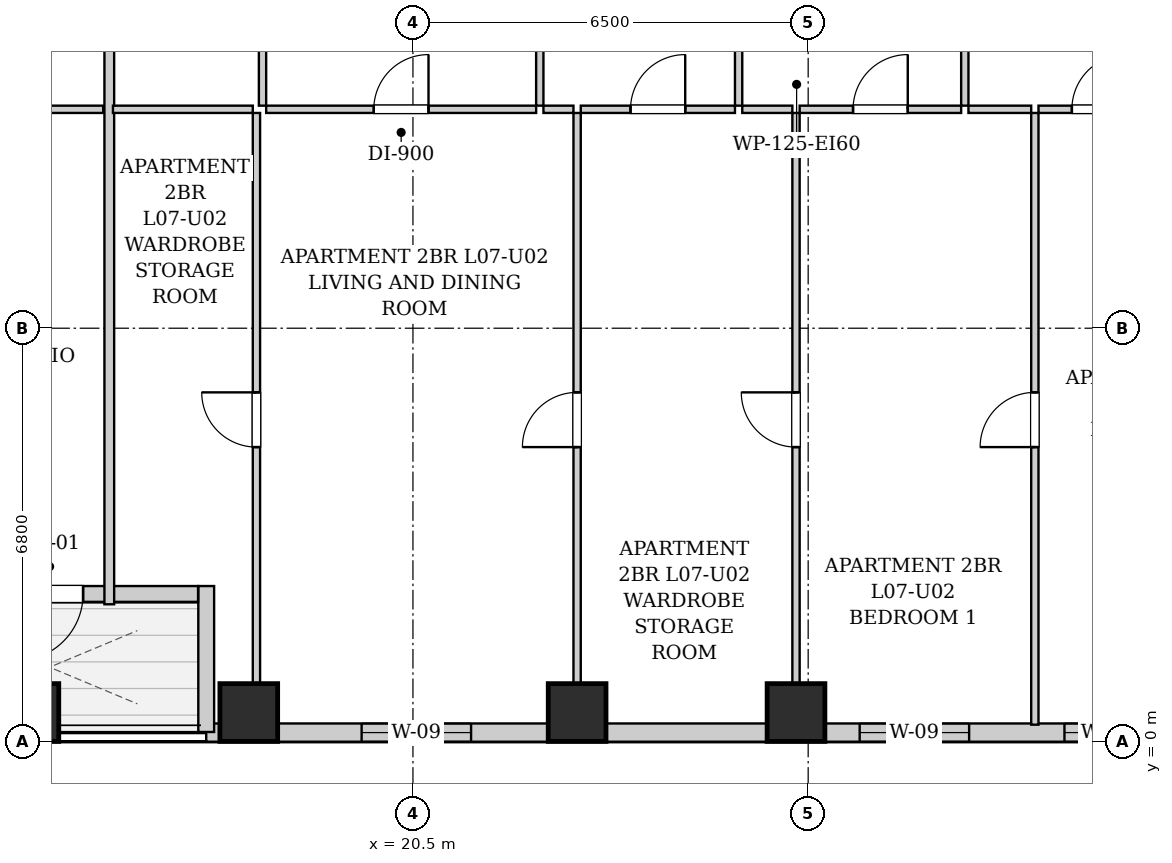
"""IFC4 building model, lengths in metres.
Left out: names, types, materials, properties, quantities, classifications, styles, units other than length and angle.
Written with IfcOpenShell. Run it as: python <this file> out.ifc"""

import sys

from ifc_helpers import new_model, si_unit, direction, frame, frame_2d, origin, origin_2d, place, context, subcontext, project, spatial, rectangle, extrude, element, fill, save


model = new_model("IFC4")
c1 = context("Model", 3, precision=1e-05, world=origin(), true_north=direction((0.0, 1.0)))
c2 = subcontext(c1, "Body", "Model", "MODEL_VIEW")
j1 = project(units=[si_unit("LENGTHUNIT", "METRE"), si_unit("PLANEANGLEUNIT", "RADIAN")], contexts=[c1])
p1 = place(None, origin())
s1 = spatial("IfcSite", under=j1, at=p1, CompositionType="ELEMENT")
p2 = place(p1, origin())
s2 = spatial("IfcBuilding", under=s1, at=p2, CompositionType="ELEMENT")
p3 = place(p2, frame((0.0, 0.0, 32.2)))
s3 = spatial("IfcBuildingStorey", under=s2, at=p3, CompositionType="ELEMENT", Elevation=32.2)
for number, where, z_axis, x_axis in (
    (1, (14.2, 0.48, 0.0), (0.0, 0.0, 1.0), (1.0, 0.0, 0.0)),
    (2, (17.8, 0.48, 0.0), (0.0, 0.0, 1.0), (1.0, 0.0, 0.0)),
    (3, (23.2, 0.48, 0.0), (0.0, 0.0, 1.0), (1.0, 0.0, 0.0)),
    (4, (26.8, 0.48, 0.0), (0.0, 0.0, 1.0), (1.0, 0.0, 0.0)),
):
    element("IfcColumn", number, at=place(p3, frame(where, z_axis=z_axis, x_axis=x_axis)), inside=s3, PredefinedType="COLUMN", context=c2, shape_type="SweptSolid", body=[
        extrude(rectangle(XDim=0.95, YDim=0.95, at=origin_2d()), origin(), (0.0, 0.0, 1.0), 3.2),
    ])
p4 = place(p3, frame((44.0, 0.15, 0.0), z_axis=(0.0, 0.0, 1.0), x_axis=(-1.0, 0.0, 0.0)))
e5 = element("IfcWall", 5, at=p4, inside=s3, PredefinedType="SOLIDWALL", context=c2, shape_type="SweptSolid", body=[
    extrude(rectangle(XDim=26.9, YDim=0.3, at=frame_2d((13.45, 0.0))), origin(), (0.0, 0.0, 1.0), 1.975),
])
p5 = place(p4, frame((22.544, 0.0, 0.55)))
e6 = element("IfcOpeningElement", 6, at=p5, cuts=e5, PredefinedType="OPENING", context=c2, shape_type="SweptSolid", body=[
    extrude(rectangle(XDim=1.8, YDim=1.2, at=frame_2d((0.9, 0.6))), frame((0.0, 0.16, 0.0), z_axis=(0.0, -1.0, 0.0), x_axis=(1.0, 0.0, 0.0)), (0.0, 0.0, 1.0), 0.32),
])
p6 = place(p4, frame((14.353, 0.0, 0.55)))
e7 = element("IfcOpeningElement", 7, at=p6, cuts=e5, PredefinedType="OPENING", context=c2, shape_type="SweptSolid", body=[
    extrude(rectangle(XDim=1.8, YDim=1.2, at=frame_2d((0.9, 0.6))), frame((0.0, 0.16, 0.0), z_axis=(0.0, -1.0, 0.0), x_axis=(1.0, 0.0, 0.0)), (0.0, 0.0, 1.0), 0.32),
])
p7 = place(p4, frame((11.435, 0.0, 0.55)))
e8 = element("IfcOpeningElement", 8, at=p7, cuts=e5, PredefinedType="OPENING", context=c2, shape_type="SweptSolid", body=[
    extrude(rectangle(XDim=1.35, YDim=1.2, at=frame_2d((0.675, 0.6))), frame((0.0, 0.16, 0.0), z_axis=(0.0, -1.0, 0.0), x_axis=(1.0, 0.0, 0.0)), (0.0, 0.0, 1.0), 0.32),
])
p8 = place(p4, frame((6.839, 0.0, 0.55)))
e9 = element("IfcOpeningElement", 9, at=p8, cuts=e5, PredefinedType="OPENING", context=c2, shape_type="SweptSolid", body=[
    extrude(rectangle(XDim=1.8, YDim=1.2, at=frame_2d((0.9, 0.6))), frame((0.0, 0.16, 0.0), z_axis=(0.0, -1.0, 0.0), x_axis=(1.0, 0.0, 0.0)), (0.0, 0.0, 1.0), 0.32),
])
p9 = place(p4, frame((2.331, 0.0, 0.55)))
e10 = element("IfcOpeningElement", 10, at=p9, cuts=e5, PredefinedType="OPENING", context=c2, shape_type="SweptSolid", body=[
    extrude(rectangle(XDim=1.8, YDim=1.2, at=frame_2d((0.9, 0.6))), frame((0.0, 0.16, 0.0), z_axis=(0.0, -1.0, 0.0), x_axis=(1.0, 0.0, 0.0)), (0.0, 0.0, 1.0), 0.32),
])
p10 = place(p3, frame((17.1, 0.16, 0.0), z_axis=(0.0, 0.0, 1.0), x_axis=(0.0, 1.0, 0.0)))
e11 = element("IfcWall", 11, at=p10, inside=s3, PredefinedType="SOLIDWALL", context=c2, shape_type="SweptSolid", body=[
    extrude(rectangle(XDim=2.4, YDim=0.26, at=frame_2d((1.2, 0.0))), origin(), (0.0, 0.0, 1.0), 2.94),
])
p11 = place(p3, frame((16.966, 2.43, 0.0), z_axis=(0.0, 0.0, 1.0), x_axis=(-1.0, 0.0, 0.0)))
e12 = element("IfcWall", 12, at=p11, inside=s3, PredefinedType="SOLIDWALL", context=c2, shape_type="SweptSolid", body=[
    extrude(rectangle(XDim=4.882, YDim=0.26, at=frame_2d((2.441, 0.0))), origin(), (0.0, 0.0, 1.0), 2.94),
])
p12 = place(p11, frame((1.891, 0.0, 0.0)))
e13 = element("IfcOpeningElement", 13, at=p12, cuts=e12, PredefinedType="OPENING", context=c2, shape_type="SweptSolid", body=[
    extrude(rectangle(XDim=1.1, YDim=2.0, at=frame_2d((0.55, 1.0))), frame((0.0, 0.14, 0.0), z_axis=(0.0, -1.0, 0.0), x_axis=(1.0, 0.0, 0.0)), (0.0, 0.0, 1.0), 0.28),
])
p13 = place(p3, frame((12.05, 10.4, 0.0), z_axis=(0.0, 0.0, 1.0), x_axis=(1.0, 0.0, 0.0)))
e14 = element("IfcWall", 14, at=p13, inside=s3, PredefinedType="PARTITIONING", context=c2, shape_type="SweptSolid", body=[
    extrude(rectangle(XDim=3.356, YDim=0.12, at=frame_2d((1.678, 0.0))), origin(), (0.0, 0.0, 1.0), 2.94),
])
p14 = place(p13, frame((1.228, 0.0, 0.0)))
e15 = element("IfcOpeningElement", 15, at=p14, cuts=e14, PredefinedType="OPENING", context=c2, shape_type="SweptSolid", body=[
    extrude(rectangle(XDim=0.9, YDim=2.05, at=frame_2d((0.45, 1.025))), frame((0.0, 0.07, 0.0), z_axis=(0.0, -1.0, 0.0), x_axis=(1.0, 0.0, 0.0)), (0.0, 0.0, 1.0), 0.14),
])
p15 = place(p3, frame((15.506, 2.26, 0.0), z_axis=(0.0, 0.0, 1.0), x_axis=(0.0, 1.0, 0.0)))
e16 = element("IfcWall", 16, at=p15, inside=s3, PredefinedType="PARTITIONING", context=c2, shape_type="SweptSolid", body=[
    extrude(rectangle(XDim=11.05, YDim=0.16, at=frame_2d((5.525, 0.0))), origin(), (0.0, 0.0, 1.0), 2.94),
])
p16 = place(p3, frame((18.026, 10.46, 0.0), z_axis=(0.0, 0.0, 1.0), x_axis=(0.0, 1.0, 0.0)))
e17 = element("IfcWall", 17, at=p16, inside=s3, PredefinedType="PARTITIONING", context=c2, shape_type="SweptSolid", body=[
    extrude(rectangle(XDim=2.85, YDim=0.12, at=frame_2d((1.425, 0.0))), origin(), (0.0, 0.0, 1.0), 2.94),
])
p17 = place(p16, frame((0.995, 0.0, 0.0)))
e18 = element("IfcOpeningElement", 18, at=p17, cuts=e17, PredefinedType="OPENING", context=c2, shape_type="SweptSolid", body=[
    extrude(rectangle(XDim=0.86, YDim=2.05, at=frame_2d((0.43, 1.025))), frame((0.0, 0.07, 0.0), z_axis=(0.0, -1.0, 0.0), x_axis=(1.0, 0.0, 0.0)), (0.0, 0.0, 1.0), 0.14),
])
p18 = place(p3, frame((15.566, 10.4, 0.0), z_axis=(0.0, 0.0, 1.0), x_axis=(1.0, 0.0, 0.0)))
e19 = element("IfcWall", 19, at=p18, inside=s3, PredefinedType="PARTITIONING", context=c2, shape_type="SweptSolid", body=[
    extrude(rectangle(XDim=2.3, YDim=0.12, at=frame_2d((1.15, 0.0))), origin(), (0.0, 0.0, 1.0), 2.94),
])
p19 = place(p3, frame((22.586, 10.46, 0.0), z_axis=(0.0, 0.0, 1.0), x_axis=(0.0, 1.0, 0.0)))
e20 = element("IfcWall", 20, at=p19, inside=s3, PredefinedType="PARTITIONING", context=c2, shape_type="SweptSolid", body=[
    extrude(rectangle(XDim=2.85, YDim=0.12, at=frame_2d((1.425, 0.0))), origin(), (0.0, 0.0, 1.0), 2.94),
])
p20 = place(p19, frame((0.975, 0.0, 0.0)))
e21 = element("IfcOpeningElement", 21, at=p20, cuts=e20, PredefinedType="OPENING", context=c2, shape_type="SweptSolid", body=[
    extrude(rectangle(XDim=0.9, YDim=2.05, at=frame_2d((0.45, 1.025))), frame((0.0, 0.07, 0.0), z_axis=(0.0, -1.0, 0.0), x_axis=(1.0, 0.0, 0.0)), (0.0, 0.0, 1.0), 0.14),
])
p21 = place(p3, frame((18.086, 10.4, 0.0), z_axis=(0.0, 0.0, 1.0), x_axis=(1.0, 0.0, 0.0)))
e22 = element("IfcWall", 22, at=p21, inside=s3, PredefinedType="PARTITIONING", context=c2, shape_type="SweptSolid", body=[
    extrude(rectangle(XDim=4.44, YDim=0.12, at=frame_2d((2.22, 0.0))), origin(), (0.0, 0.0, 1.0), 2.94),
])
p22 = place(p21, frame((1.77, 0.0, 0.0)))
e23 = element("IfcOpeningElement", 23, at=p22, cuts=e22, PredefinedType="OPENING", context=c2, shape_type="SweptSolid", body=[
    extrude(rectangle(XDim=0.9, YDim=2.05, at=frame_2d((0.45, 1.025))), frame((0.0, 0.07, 0.0), z_axis=(0.0, -1.0, 0.0), x_axis=(1.0, 0.0, 0.0)), (0.0, 0.0, 1.0), 0.14),
])
p23 = place(p3, frame((25.856, 10.46, 0.0), z_axis=(0.0, 0.0, 1.0), x_axis=(0.0, 1.0, 0.0)))
e24 = element("IfcWall", 24, at=p23, inside=s3, PredefinedType="PARTITIONING", context=c2, shape_type="SweptSolid", body=[
    extrude(rectangle(XDim=2.85, YDim=0.12, at=frame_2d((1.425, 0.0))), origin(), (0.0, 0.0, 1.0), 2.94),
])
p24 = place(p23, frame((0.975, 0.0, 0.0)))
e25 = element("IfcOpeningElement", 25, at=p24, cuts=e24, PredefinedType="OPENING", context=c2, shape_type="SweptSolid", body=[
    extrude(rectangle(XDim=0.9, YDim=2.05, at=frame_2d((0.45, 1.025))), frame((0.0, 0.07, 0.0), z_axis=(0.0, -1.0, 0.0), x_axis=(1.0, 0.0, 0.0)), (0.0, 0.0, 1.0), 0.14),
])
p25 = place(p3, frame((22.646, 10.4, 0.0), z_axis=(0.0, 0.0, 1.0), x_axis=(1.0, 0.0, 0.0)))
e26 = element("IfcWall", 26, at=p25, inside=s3, PredefinedType="PARTITIONING", context=c2, shape_type="SweptSolid", body=[
    extrude(rectangle(XDim=0.494, YDim=0.12, at=frame_2d((0.247, 0.0))), origin(), (0.0, 0.0, 1.0), 2.94),
])
p26 = place(p3, frame((23.26, 10.4, 0.0), z_axis=(0.0, 0.0, 1.0), x_axis=(1.0, 0.0, 0.0)))
e27 = element("IfcWall", 27, at=p26, inside=s3, PredefinedType="PARTITIONING", context=c2, shape_type="SweptSolid", body=[
    extrude(rectangle(XDim=2.536, YDim=0.12, at=frame_2d((1.268, 0.0))), origin(), (0.0, 0.0, 1.0), 2.94),
])
p27 = place(p26, frame((0.818, 0.0, 0.0)))
e28 = element("IfcOpeningElement", 28, at=p27, cuts=e27, PredefinedType="OPENING", context=c2, shape_type="SweptSolid", body=[
    extrude(rectangle(XDim=0.9, YDim=2.05, at=frame_2d((0.45, 1.025))), frame((0.0, 0.07, 0.0), z_axis=(0.0, -1.0, 0.0), x_axis=(1.0, 0.0, 0.0)), (0.0, 0.0, 1.0), 0.14),
])
p28 = place(p3, frame((29.576, 10.46, 0.0), z_axis=(0.0, 0.0, 1.0), x_axis=(0.0, 1.0, 0.0)))
e29 = element("IfcWall", 29, at=p28, inside=s3, PredefinedType="PARTITIONING", context=c2, shape_type="SweptSolid", body=[
    extrude(rectangle(XDim=2.85, YDim=0.12, at=frame_2d((1.425, 0.0))), origin(), (0.0, 0.0, 1.0), 2.94),
])
p29 = place(p28, frame((0.975, 0.0, 0.0)))
e30 = element("IfcOpeningElement", 30, at=p29, cuts=e29, PredefinedType="OPENING", context=c2, shape_type="SweptSolid", body=[
    extrude(rectangle(XDim=0.9, YDim=2.05, at=frame_2d((0.45, 1.025))), frame((0.0, 0.07, 0.0), z_axis=(0.0, -1.0, 0.0), x_axis=(1.0, 0.0, 0.0)), (0.0, 0.0, 1.0), 0.14),
])
p30 = place(p3, frame((25.916, 10.4, 0.0), z_axis=(0.0, 0.0, 1.0), x_axis=(1.0, 0.0, 0.0)))
e31 = element("IfcWall", 31, at=p30, inside=s3, PredefinedType="PARTITIONING", context=c2, shape_type="SweptSolid", body=[
    extrude(rectangle(XDim=0.824, YDim=0.12, at=frame_2d((0.412, 0.0))), origin(), (0.0, 0.0, 1.0), 2.94),
])
p31 = place(p3, frame((26.86, 10.4, 0.0), z_axis=(0.0, 0.0, 1.0), x_axis=(1.0, 0.0, 0.0)))
e32 = element("IfcWall", 32, at=p31, inside=s3, PredefinedType="PARTITIONING", context=c2, shape_type="SweptSolid", body=[
    extrude(rectangle(XDim=2.656, YDim=0.12, at=frame_2d((1.328, 0.0))), origin(), (0.0, 0.0, 1.0), 2.94),
])
p32 = place(p31, frame((0.878, 0.0, 0.0)))
e33 = element("IfcOpeningElement", 33, at=p32, cuts=e32, PredefinedType="OPENING", context=c2, shape_type="SweptSolid", body=[
    extrude(rectangle(XDim=0.9, YDim=2.05, at=frame_2d((0.45, 1.025))), frame((0.0, 0.07, 0.0), z_axis=(0.0, -1.0, 0.0), x_axis=(1.0, 0.0, 0.0)), (0.0, 0.0, 1.0), 0.14),
])
p33 = place(p3, frame((29.636, 10.4, 0.0), z_axis=(0.0, 0.0, 1.0), x_axis=(1.0, 0.0, 0.0)))
e34 = element("IfcWall", 34, at=p33, inside=s3, PredefinedType="PARTITIONING", context=c2, shape_type="SweptSolid", body=[
    extrude(rectangle(XDim=1.032, YDim=0.12, at=frame_2d((0.516, 0.0))), origin(), (0.0, 0.0, 1.0), 2.94),
])
p34 = place(p3, frame((30.788, 10.4, 0.0), z_axis=(0.0, 0.0, 1.0), x_axis=(1.0, 0.0, 0.0)))
e35 = element("IfcWall", 35, at=p34, inside=s3, PredefinedType="PARTITIONING", context=c2, shape_type="SweptSolid", body=[
    extrude(rectangle(XDim=1.998, YDim=0.12, at=frame_2d((0.999, 0.0))), origin(), (0.0, 0.0, 1.0), 2.94),
])
p35 = place(p34, frame((0.549, 0.0, 0.0)))
e36 = element("IfcOpeningElement", 36, at=p35, cuts=e35, PredefinedType="OPENING", context=c2, shape_type="SweptSolid", body=[
    extrude(rectangle(XDim=0.9, YDim=2.05, at=frame_2d((0.45, 1.025))), frame((0.0, 0.07, 0.0), z_axis=(0.0, -1.0, 0.0), x_axis=(1.0, 0.0, 0.0)), (0.0, 0.0, 1.0), 0.14),
])
p36 = place(p3, frame((17.926, 0.28, 0.0), z_axis=(0.0, 0.0, 1.0), x_axis=(0.0, 1.0, 0.0)))
e37 = element("IfcWall", 37, at=p36, inside=s3, PredefinedType="PARTITIONING", context=c2, shape_type="SweptSolid", body=[
    extrude(rectangle(XDim=10.06, YDim=0.12, at=frame_2d((5.03, 0.0))), origin(), (0.0, 0.0, 1.0), 2.155),
])
p37 = place(p36, frame((4.565, 0.0, 0.0)))
e38 = element("IfcOpeningElement", 38, at=p37, cuts=e37, PredefinedType="OPENING", context=c2, shape_type="SweptSolid", body=[
    extrude(rectangle(XDim=0.9, YDim=2.05, at=frame_2d((0.45, 1.025))), frame((0.0, 0.07, 0.0), z_axis=(0.0, -1.0, 0.0), x_axis=(1.0, 0.0, 0.0)), (0.0, 0.0, 1.0), 0.14),
])
p38 = place(p3, frame((23.2, 0.28, 0.0), z_axis=(0.0, 0.0, 1.0), x_axis=(0.0, 1.0, 0.0)))
e39 = element("IfcWall", 39, at=p38, inside=s3, PredefinedType="PARTITIONING", context=c2, shape_type="SweptSolid", body=[
    extrude(rectangle(XDim=10.06, YDim=0.12, at=frame_2d((5.03, 0.0))), origin(), (0.0, 0.0, 1.0), 2.94),
])
p39 = place(p38, frame((4.565, 0.0, 0.0)))
e40 = element("IfcOpeningElement", 40, at=p39, cuts=e39, PredefinedType="OPENING", context=c2, shape_type="SweptSolid", body=[
    extrude(rectangle(XDim=0.9, YDim=2.05, at=frame_2d((0.45, 1.025))), frame((0.0, 0.07, 0.0), z_axis=(0.0, -1.0, 0.0), x_axis=(1.0, 0.0, 0.0)), (0.0, 0.0, 1.0), 0.14),
])
p40 = place(p3, frame((26.8, 0.28, 0.0), z_axis=(0.0, 0.0, 1.0), x_axis=(0.0, 1.0, 0.0)))
e41 = element("IfcWall", 41, at=p40, inside=s3, PredefinedType="PARTITIONING", context=c2, shape_type="SweptSolid", body=[
    extrude(rectangle(XDim=10.06, YDim=0.12, at=frame_2d((5.03, 0.0))), origin(), (0.0, 0.0, 1.0), 2.94),
])
p41 = place(p40, frame((4.565, 0.0, 0.0)))
e42 = element("IfcOpeningElement", 42, at=p41, cuts=e41, PredefinedType="OPENING", context=c2, shape_type="SweptSolid", body=[
    extrude(rectangle(XDim=0.9, YDim=2.05, at=frame_2d((0.45, 1.025))), frame((0.0, 0.07, 0.0), z_axis=(0.0, -1.0, 0.0), x_axis=(1.0, 0.0, 0.0)), (0.0, 0.0, 1.0), 0.14),
])
p42 = place(p3, frame((30.728, 0.28, 0.0), z_axis=(0.0, 0.0, 1.0), x_axis=(0.0, 1.0, 0.0)))
e43 = element("IfcWall", 43, at=p42, inside=s3, PredefinedType="PARTITIONING", context=c2, shape_type="SweptSolid", body=[
    extrude(rectangle(XDim=10.06, YDim=0.12, at=frame_2d((5.03, 0.0))), origin(), (0.0, 0.0, 1.0), 2.94),
])
p43 = place(p42, frame((4.565, 0.0, 0.0)))
e44 = element("IfcOpeningElement", 44, at=p43, cuts=e43, PredefinedType="OPENING", context=c2, shape_type="SweptSolid", body=[
    extrude(rectangle(XDim=0.9, YDim=2.05, at=frame_2d((0.45, 1.025))), frame((0.0, 0.07, 0.0), z_axis=(0.0, -1.0, 0.0), x_axis=(1.0, 0.0, 0.0)), (0.0, 0.0, 1.0), 0.14),
])
p44 = place(p22, origin())
e45 = element("IfcDoor", 45, at=p44, inside=s3, OperationType="SINGLE_SWING_RIGHT", PredefinedType="DOOR", context=c2, shape_type="SweptSolid", body=[
    extrude(rectangle(XDim=0.9, YDim=2.05, at=frame_2d((0.45, 1.025))), frame((0.0, 0.025, 0.0), z_axis=(0.0, -1.0, 0.0), x_axis=(1.0, 0.0, 0.0)), (0.0, 0.0, 1.0), 0.05),
])
fill(e23, e45)
p45 = place(p27, origin())
e46 = element("IfcDoor", 46, at=p45, inside=s3, OperationType="SINGLE_SWING_RIGHT", PredefinedType="DOOR", context=c2, shape_type="SweptSolid", body=[
    extrude(rectangle(XDim=0.9, YDim=2.05, at=frame_2d((0.45, 1.025))), frame((0.0, 0.025, 0.0), z_axis=(0.0, -1.0, 0.0), x_axis=(1.0, 0.0, 0.0)), (0.0, 0.0, 1.0), 0.05),
])
fill(e28, e46)
p46 = place(p32, origin())
e47 = element("IfcDoor", 47, at=p46, inside=s3, OperationType="SINGLE_SWING_RIGHT", PredefinedType="DOOR", context=c2, shape_type="SweptSolid", body=[
    extrude(rectangle(XDim=0.9, YDim=2.05, at=frame_2d((0.45, 1.025))), frame((0.0, 0.025, 0.0), z_axis=(0.0, -1.0, 0.0), x_axis=(1.0, 0.0, 0.0)), (0.0, 0.0, 1.0), 0.05),
])
fill(e33, e47)
p47 = place(p35, origin())
e48 = element("IfcDoor", 48, at=p47, inside=s3, OperationType="SINGLE_SWING_RIGHT", PredefinedType="DOOR", context=c2, shape_type="SweptSolid", body=[
    extrude(rectangle(XDim=0.9, YDim=2.05, at=frame_2d((0.45, 1.025))), frame((0.0, 0.025, 0.0), z_axis=(0.0, -1.0, 0.0), x_axis=(1.0, 0.0, 0.0)), (0.0, 0.0, 1.0), 0.05),
])
fill(e36, e48)
p48 = place(p37, origin())
e49 = element("IfcDoor", 49, at=p48, inside=s3, OperationType="SINGLE_SWING_RIGHT", PredefinedType="DOOR", context=c2, shape_type="SweptSolid", body=[
    extrude(rectangle(XDim=0.9, YDim=2.05, at=frame_2d((0.45, 1.025))), frame((0.0, 0.025, 0.0), z_axis=(0.0, -1.0, 0.0), x_axis=(1.0, 0.0, 0.0)), (0.0, 0.0, 1.0), 0.05),
])
fill(e38, e49)
p49 = place(p39, origin())
e50 = element("IfcDoor", 50, at=p49, inside=s3, OperationType="SINGLE_SWING_LEFT", PredefinedType="DOOR", context=c2, shape_type="SweptSolid", body=[
    extrude(rectangle(XDim=0.9, YDim=2.05, at=frame_2d((0.45, 1.025))), frame((0.0, 0.025, 0.0), z_axis=(0.0, -1.0, 0.0), x_axis=(1.0, 0.0, 0.0)), (0.0, 0.0, 1.0), 0.05),
])
fill(e40, e50)
p50 = place(p41, origin())
e51 = element("IfcDoor", 51, at=p50, inside=s3, OperationType="SINGLE_SWING_RIGHT", PredefinedType="DOOR", context=c2, shape_type="SweptSolid", body=[
    extrude(rectangle(XDim=0.9, YDim=2.05, at=frame_2d((0.45, 1.025))), frame((0.0, 0.025, 0.0), z_axis=(0.0, -1.0, 0.0), x_axis=(1.0, 0.0, 0.0)), (0.0, 0.0, 1.0), 0.05),
])
fill(e42, e51)
p51 = place(p43, origin())
e52 = element("IfcDoor", 52, at=p51, inside=s3, OperationType="SINGLE_SWING_LEFT", PredefinedType="DOOR", context=c2, shape_type="SweptSolid", body=[
    extrude(rectangle(XDim=0.9, YDim=2.05, at=frame_2d((0.45, 1.025))), frame((0.0, 0.025, 0.0), z_axis=(0.0, -1.0, 0.0), x_axis=(1.0, 0.0, 0.0)), (0.0, 0.0, 1.0), 0.05),
])
fill(e44, e52)
p52 = place(p12, origin())
e53 = element("IfcDoor", 53, at=p52, inside=s3, OperationType="SINGLE_SWING_RIGHT", PredefinedType="DOOR", context=c2, shape_type="SweptSolid", body=[
    extrude(rectangle(XDim=1.1, YDim=2.0, at=frame_2d((0.55, 1.0))), frame((0.0, 0.025, 0.0), z_axis=(0.0, -1.0, 0.0), x_axis=(1.0, 0.0, 0.0)), (0.0, 0.0, 1.0), 0.05),
])
fill(e13, e53)
p53 = place(p5, origin())
e54 = element("IfcWindow", 54, at=p53, inside=s3, PartitioningType="DOUBLE_PANEL_VERTICAL", PredefinedType="WINDOW", context=c2, shape_type="SweptSolid", body=[
    extrude(rectangle(XDim=1.8, YDim=1.2, at=frame_2d((0.9, 0.6))), frame((0.0, 0.03, 0.0), z_axis=(0.0, -1.0, 0.0), x_axis=(1.0, 0.0, 0.0)), (0.0, 0.0, 1.0), 0.06),
])
fill(e6, e54)
p54 = place(p6, origin())
e55 = element("IfcWindow", 55, at=p54, inside=s3, PartitioningType="DOUBLE_PANEL_VERTICAL", PredefinedType="WINDOW", context=c2, shape_type="SweptSolid", body=[
    extrude(rectangle(XDim=1.8, YDim=1.2, at=frame_2d((0.9, 0.6))), frame((0.0, 0.03, 0.0), z_axis=(0.0, -1.0, 0.0), x_axis=(1.0, 0.0, 0.0)), (0.0, 0.0, 1.0), 0.06),
])
fill(e7, e55)
p55 = place(p7, origin())
e56 = element("IfcWindow", 56, at=p55, inside=s3, PartitioningType="SINGLE_PANEL", PredefinedType="WINDOW", context=c2, shape_type="SweptSolid", body=[
    extrude(rectangle(XDim=1.35, YDim=1.2, at=frame_2d((0.675, 0.6))), frame((0.0, 0.03, 0.0), z_axis=(0.0, -1.0, 0.0), x_axis=(1.0, 0.0, 0.0)), (0.0, 0.0, 1.0), 0.06),
])
fill(e8, e56)
save(model, sys.argv[1])
